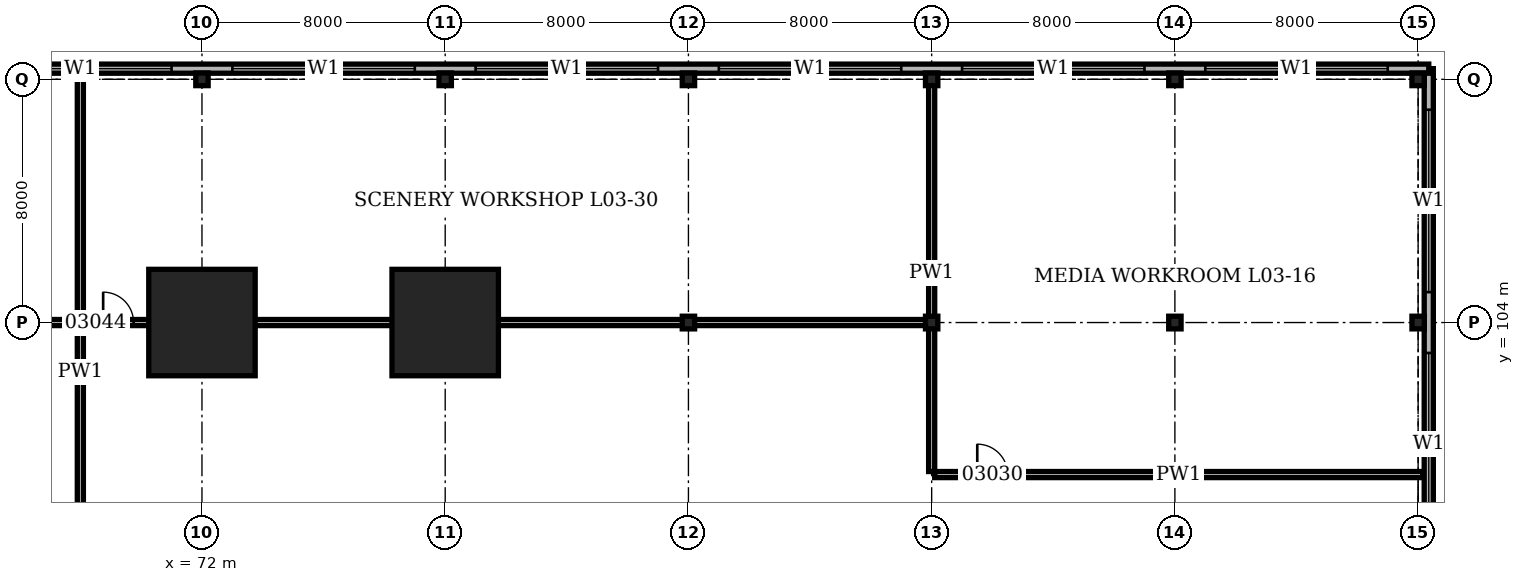
"""IFC4 building model, lengths in metres.
Left out: names, types, materials, properties, quantities, classifications, styles, units other than length and angle.
Written with IfcOpenShell. Run it as: python <this file> out.ifc"""

import sys

from ifc_helpers import new_model, si_unit, direction, frame, frame_2d, origin, origin_2d, place, context, subcontext, project, spatial, rectangle, hollow_rectangle, i_section, extrude, element, fill, save


model = new_model("IFC4")
c1 = context("Model", 3, precision=1e-05, world=origin(), true_north=direction((0.0, 1.0)))
c2 = subcontext(c1, "Body", "Model", "MODEL_VIEW")
j1 = project(units=[si_unit("LENGTHUNIT", "METRE"), si_unit("PLANEANGLEUNIT", "RADIAN")], contexts=[c1])
p1 = place(None, origin())
s1 = spatial("IfcSite", under=j1, at=p1, CompositionType="ELEMENT")
p2 = place(p1, origin())
s2 = spatial("IfcBuilding", under=s1, at=p2, CompositionType="ELEMENT")
p3 = place(p2, frame((0.0, 0.0, 14.9)))
s3 = spatial("IfcBuildingStorey", under=s2, at=p3, CompositionType="ELEMENT", Elevation=14.9)
p4 = place(p3, frame((72.0, 104.0, 0.0), z_axis=(0.0, 0.0, 1.0), x_axis=(1.0, 0.0, 0.0)))
e1 = element("IfcColumn", 1, at=p4, inside=s3, PredefinedType="COLUMN", context=c2, shape_type="SweptSolid", body=[
    extrude(hollow_rectangle(XDim=3.5, YDim=3.5, WallThickness=0.5, at=origin_2d()), origin(), (0.0, 0.0, 1.0), 5.0),
])
p5 = place(p3, frame((72.0, 112.0, 0.0), z_axis=(0.0, 0.0, 1.0), x_axis=(1.0, 0.0, 0.0)))
e2 = element("IfcColumn", 2, at=p5, inside=s3, PredefinedType="COLUMN", context=c2, shape_type="SweptSolid", body=[
    extrude(i_section(OverallWidth=0.406, OverallDepth=0.417, WebThickness=0.03, FlangeThickness=0.048, at=origin_2d()), origin(), (0.0, 0.0, 1.0), 5.0),
])
p6 = place(p3, frame((80.0, 104.0, 0.0), z_axis=(0.0, 0.0, 1.0), x_axis=(1.0, 0.0, 0.0)))
e3 = element("IfcColumn", 3, at=p6, inside=s3, PredefinedType="COLUMN", context=c2, shape_type="SweptSolid", body=[
    extrude(hollow_rectangle(XDim=3.5, YDim=3.5, WallThickness=0.5, at=origin_2d()), origin(), (0.0, 0.0, 1.0), 5.0),
])
for number, where, z_axis, x_axis in (
    (4, (80.0, 112.0, 0.0), (0.0, 0.0, 1.0), (1.0, 0.0, 0.0)),
    (5, (88.0, 104.0, 0.0), (0.0, 0.0, 1.0), (1.0, 0.0, 0.0)),
    (6, (88.0, 112.0, 0.0), (0.0, 0.0, 1.0), (1.0, 0.0, 0.0)),
    (7, (96.0, 104.0, 0.0), (0.0, 0.0, 1.0), (1.0, 0.0, 0.0)),
    (8, (96.0, 112.0, 0.0), (0.0, 0.0, 1.0), (1.0, 0.0, 0.0)),
    (9, (104.0, 104.0, 0.0), (0.0, 0.0, 1.0), (1.0, 0.0, 0.0)),
    (10, (104.0, 112.0, 0.0), (0.0, 0.0, 1.0), (1.0, 0.0, 0.0)),
    (11, (112.0, 104.0, 0.0), (0.0, 0.0, 1.0), (1.0, 0.0, 0.0)),
    (12, (112.0, 112.0, 0.0), (0.0, 0.0, 1.0), (1.0, 0.0, 0.0)),
):
    element("IfcColumn", number, at=place(p3, frame(where, z_axis=z_axis, x_axis=x_axis)), inside=s3, PredefinedType="COLUMN", context=c2, shape_type="SweptSolid", body=[
        extrude(i_section(OverallWidth=0.406, OverallDepth=0.417, WebThickness=0.03, FlangeThickness=0.048, at=origin_2d()), origin(), (0.0, 0.0, 1.0), 5.0),
    ])
p7 = place(p3, frame((112.35, -0.35, 0.0), z_axis=(0.0, 0.0, 1.0), x_axis=(0.0, 1.0, 0.0)))
e13 = element("IfcWall", 13, at=p7, inside=s3, PredefinedType="SOLIDWALL", context=c2, shape_type="SweptSolid", body=[
    extrude(rectangle(XDim=112.7, YDim=0.3, at=frame_2d((56.35, 0.0))), origin(), (0.0, 0.0, 1.0), 5.0),
])
p8 = place(p7, frame((1.35, 0.0, 1.0)))
e14 = element("IfcOpeningElement", 14, at=p8, cuts=e13, PredefinedType="OPENING", context=c2, shape_type="SweptSolid", body=[
    extrude(rectangle(XDim=6.0, YDim=1.5, at=frame_2d((3.0, 0.75))), frame((0.0, 0.16, 0.0), z_axis=(0.0, -1.0, 0.0), x_axis=(1.0, 0.0, 0.0)), (0.0, 0.0, 1.0), 0.32),
])
p9 = place(p7, frame((9.35, 0.0, 1.0)))
e15 = element("IfcOpeningElement", 15, at=p9, cuts=e13, PredefinedType="OPENING", context=c2, shape_type="SweptSolid", body=[
    extrude(rectangle(XDim=6.0, YDim=1.5, at=frame_2d((3.0, 0.75))), frame((0.0, 0.16, 0.0), z_axis=(0.0, -1.0, 0.0), x_axis=(1.0, 0.0, 0.0)), (0.0, 0.0, 1.0), 0.32),
])
p10 = place(p7, frame((17.35, 0.0, 1.0)))
e16 = element("IfcOpeningElement", 16, at=p10, cuts=e13, PredefinedType="OPENING", context=c2, shape_type="SweptSolid", body=[
    extrude(rectangle(XDim=6.0, YDim=1.5, at=frame_2d((3.0, 0.75))), frame((0.0, 0.16, 0.0), z_axis=(0.0, -1.0, 0.0), x_axis=(1.0, 0.0, 0.0)), (0.0, 0.0, 1.0), 0.32),
])
p11 = place(p7, frame((25.35, 0.0, 1.0)))
e17 = element("IfcOpeningElement", 17, at=p11, cuts=e13, PredefinedType="OPENING", context=c2, shape_type="SweptSolid", body=[
    extrude(rectangle(XDim=6.0, YDim=1.5, at=frame_2d((3.0, 0.75))), frame((0.0, 0.16, 0.0), z_axis=(0.0, -1.0, 0.0), x_axis=(1.0, 0.0, 0.0)), (0.0, 0.0, 1.0), 0.32),
])
p12 = place(p7, frame((33.35, 0.0, 1.0)))
e18 = element("IfcOpeningElement", 18, at=p12, cuts=e13, PredefinedType="OPENING", context=c2, shape_type="SweptSolid", body=[
    extrude(rectangle(XDim=6.0, YDim=1.5, at=frame_2d((3.0, 0.75))), frame((0.0, 0.16, 0.0), z_axis=(0.0, -1.0, 0.0), x_axis=(1.0, 0.0, 0.0)), (0.0, 0.0, 1.0), 0.32),
])
p13 = place(p7, frame((41.35, 0.0, 1.0)))
e19 = element("IfcOpeningElement", 19, at=p13, cuts=e13, PredefinedType="OPENING", context=c2, shape_type="SweptSolid", body=[
    extrude(rectangle(XDim=6.0, YDim=1.5, at=frame_2d((3.0, 0.75))), frame((0.0, 0.16, 0.0), z_axis=(0.0, -1.0, 0.0), x_axis=(1.0, 0.0, 0.0)), (0.0, 0.0, 1.0), 0.32),
])
p14 = place(p7, frame((49.35, 0.0, 1.0)))
e20 = element("IfcOpeningElement", 20, at=p14, cuts=e13, PredefinedType="OPENING", context=c2, shape_type="SweptSolid", body=[
    extrude(rectangle(XDim=6.0, YDim=1.5, at=frame_2d((3.0, 0.75))), frame((0.0, 0.16, 0.0), z_axis=(0.0, -1.0, 0.0), x_axis=(1.0, 0.0, 0.0)), (0.0, 0.0, 1.0), 0.32),
])
p15 = place(p7, frame((57.35, 0.0, 1.0)))
e21 = element("IfcOpeningElement", 21, at=p15, cuts=e13, PredefinedType="OPENING", context=c2, shape_type="SweptSolid", body=[
    extrude(rectangle(XDim=6.0, YDim=1.5, at=frame_2d((3.0, 0.75))), frame((0.0, 0.16, 0.0), z_axis=(0.0, -1.0, 0.0), x_axis=(1.0, 0.0, 0.0)), (0.0, 0.0, 1.0), 0.32),
])
p16 = place(p7, frame((65.35, 0.0, 1.0)))
e22 = element("IfcOpeningElement", 22, at=p16, cuts=e13, PredefinedType="OPENING", context=c2, shape_type="SweptSolid", body=[
    extrude(rectangle(XDim=6.0, YDim=1.5, at=frame_2d((3.0, 0.75))), frame((0.0, 0.16, 0.0), z_axis=(0.0, -1.0, 0.0), x_axis=(1.0, 0.0, 0.0)), (0.0, 0.0, 1.0), 0.32),
])
p17 = place(p7, frame((73.35, 0.0, 1.0)))
e23 = element("IfcOpeningElement", 23, at=p17, cuts=e13, PredefinedType="OPENING", context=c2, shape_type="SweptSolid", body=[
    extrude(rectangle(XDim=6.0, YDim=1.5, at=frame_2d((3.0, 0.75))), frame((0.0, 0.16, 0.0), z_axis=(0.0, -1.0, 0.0), x_axis=(1.0, 0.0, 0.0)), (0.0, 0.0, 1.0), 0.32),
])
p18 = place(p7, frame((81.35, 0.0, 1.0)))
e24 = element("IfcOpeningElement", 24, at=p18, cuts=e13, PredefinedType="OPENING", context=c2, shape_type="SweptSolid", body=[
    extrude(rectangle(XDim=6.0, YDim=1.5, at=frame_2d((3.0, 0.75))), frame((0.0, 0.16, 0.0), z_axis=(0.0, -1.0, 0.0), x_axis=(1.0, 0.0, 0.0)), (0.0, 0.0, 1.0), 0.32),
])
p19 = place(p7, frame((89.35, 0.0, 1.0)))
e25 = element("IfcOpeningElement", 25, at=p19, cuts=e13, PredefinedType="OPENING", context=c2, shape_type="SweptSolid", body=[
    extrude(rectangle(XDim=6.0, YDim=1.5, at=frame_2d((3.0, 0.75))), frame((0.0, 0.16, 0.0), z_axis=(0.0, -1.0, 0.0), x_axis=(1.0, 0.0, 0.0)), (0.0, 0.0, 1.0), 0.32),
])
p20 = place(p7, frame((97.35, 0.0, 1.0)))
e26 = element("IfcOpeningElement", 26, at=p20, cuts=e13, PredefinedType="OPENING", context=c2, shape_type="SweptSolid", body=[
    extrude(rectangle(XDim=6.0, YDim=1.5, at=frame_2d((3.0, 0.75))), frame((0.0, 0.16, 0.0), z_axis=(0.0, -1.0, 0.0), x_axis=(1.0, 0.0, 0.0)), (0.0, 0.0, 1.0), 0.32),
])
p21 = place(p7, frame((105.35, 0.0, 1.0)))
e27 = element("IfcOpeningElement", 27, at=p21, cuts=e13, PredefinedType="OPENING", context=c2, shape_type="SweptSolid", body=[
    extrude(rectangle(XDim=6.0, YDim=1.5, at=frame_2d((3.0, 0.75))), frame((0.0, 0.16, 0.0), z_axis=(0.0, -1.0, 0.0), x_axis=(1.0, 0.0, 0.0)), (0.0, 0.0, 1.0), 0.32),
])
p22 = place(p3, frame((112.35, 112.35, 0.0), z_axis=(0.0, 0.0, 1.0), x_axis=(-1.0, 0.0, 0.0)))
e28 = element("IfcWall", 28, at=p22, inside=s3, PredefinedType="SOLIDWALL", context=c2, shape_type="SweptSolid", body=[
    extrude(rectangle(XDim=112.7, YDim=0.3, at=frame_2d((56.35, 0.0))), origin(), (0.0, 0.0, 1.0), 5.0),
])
p23 = place(p22, frame((1.35, 0.0, 1.0)))
e29 = element("IfcOpeningElement", 29, at=p23, cuts=e28, PredefinedType="OPENING", context=c2, shape_type="SweptSolid", body=[
    extrude(rectangle(XDim=6.0, YDim=1.5, at=frame_2d((3.0, 0.75))), frame((0.0, 0.16, 0.0), z_axis=(0.0, -1.0, 0.0), x_axis=(1.0, 0.0, 0.0)), (0.0, 0.0, 1.0), 0.32),
])
p24 = place(p22, frame((9.35, 0.0, 1.0)))
e30 = element("IfcOpeningElement", 30, at=p24, cuts=e28, PredefinedType="OPENING", context=c2, shape_type="SweptSolid", body=[
    extrude(rectangle(XDim=6.0, YDim=1.5, at=frame_2d((3.0, 0.75))), frame((0.0, 0.16, 0.0), z_axis=(0.0, -1.0, 0.0), x_axis=(1.0, 0.0, 0.0)), (0.0, 0.0, 1.0), 0.32),
])
p25 = place(p22, frame((17.35, 0.0, 1.0)))
e31 = element("IfcOpeningElement", 31, at=p25, cuts=e28, PredefinedType="OPENING", context=c2, shape_type="SweptSolid", body=[
    extrude(rectangle(XDim=6.0, YDim=1.5, at=frame_2d((3.0, 0.75))), frame((0.0, 0.16, 0.0), z_axis=(0.0, -1.0, 0.0), x_axis=(1.0, 0.0, 0.0)), (0.0, 0.0, 1.0), 0.32),
])
p26 = place(p22, frame((25.35, 0.0, 1.0)))
e32 = element("IfcOpeningElement", 32, at=p26, cuts=e28, PredefinedType="OPENING", context=c2, shape_type="SweptSolid", body=[
    extrude(rectangle(XDim=6.0, YDim=1.5, at=frame_2d((3.0, 0.75))), frame((0.0, 0.16, 0.0), z_axis=(0.0, -1.0, 0.0), x_axis=(1.0, 0.0, 0.0)), (0.0, 0.0, 1.0), 0.32),
])
p27 = place(p22, frame((33.35, 0.0, 1.0)))
e33 = element("IfcOpeningElement", 33, at=p27, cuts=e28, PredefinedType="OPENING", context=c2, shape_type="SweptSolid", body=[
    extrude(rectangle(XDim=6.0, YDim=1.5, at=frame_2d((3.0, 0.75))), frame((0.0, 0.16, 0.0), z_axis=(0.0, -1.0, 0.0), x_axis=(1.0, 0.0, 0.0)), (0.0, 0.0, 1.0), 0.32),
])
p28 = place(p22, frame((41.35, 0.0, 1.0)))
e34 = element("IfcOpeningElement", 34, at=p28, cuts=e28, PredefinedType="OPENING", context=c2, shape_type="SweptSolid", body=[
    extrude(rectangle(XDim=6.0, YDim=1.5, at=frame_2d((3.0, 0.75))), frame((0.0, 0.16, 0.0), z_axis=(0.0, -1.0, 0.0), x_axis=(1.0, 0.0, 0.0)), (0.0, 0.0, 1.0), 0.32),
])
p29 = place(p22, frame((49.35, 0.0, 1.0)))
e35 = element("IfcOpeningElement", 35, at=p29, cuts=e28, PredefinedType="OPENING", context=c2, shape_type="SweptSolid", body=[
    extrude(rectangle(XDim=6.0, YDim=1.5, at=frame_2d((3.0, 0.75))), frame((0.0, 0.16, 0.0), z_axis=(0.0, -1.0, 0.0), x_axis=(1.0, 0.0, 0.0)), (0.0, 0.0, 1.0), 0.32),
])
p30 = place(p22, frame((57.35, 0.0, 1.0)))
e36 = element("IfcOpeningElement", 36, at=p30, cuts=e28, PredefinedType="OPENING", context=c2, shape_type="SweptSolid", body=[
    extrude(rectangle(XDim=6.0, YDim=1.5, at=frame_2d((3.0, 0.75))), frame((0.0, 0.16, 0.0), z_axis=(0.0, -1.0, 0.0), x_axis=(1.0, 0.0, 0.0)), (0.0, 0.0, 1.0), 0.32),
])
p31 = place(p22, frame((65.35, 0.0, 1.0)))
e37 = element("IfcOpeningElement", 37, at=p31, cuts=e28, PredefinedType="OPENING", context=c2, shape_type="SweptSolid", body=[
    extrude(rectangle(XDim=6.0, YDim=1.5, at=frame_2d((3.0, 0.75))), frame((0.0, 0.16, 0.0), z_axis=(0.0, -1.0, 0.0), x_axis=(1.0, 0.0, 0.0)), (0.0, 0.0, 1.0), 0.32),
])
p32 = place(p22, frame((73.35, 0.0, 1.0)))
e38 = element("IfcOpeningElement", 38, at=p32, cuts=e28, PredefinedType="OPENING", context=c2, shape_type="SweptSolid", body=[
    extrude(rectangle(XDim=6.0, YDim=1.5, at=frame_2d((3.0, 0.75))), frame((0.0, 0.16, 0.0), z_axis=(0.0, -1.0, 0.0), x_axis=(1.0, 0.0, 0.0)), (0.0, 0.0, 1.0), 0.32),
])
p33 = place(p22, frame((81.35, 0.0, 1.0)))
e39 = element("IfcOpeningElement", 39, at=p33, cuts=e28, PredefinedType="OPENING", context=c2, shape_type="SweptSolid", body=[
    extrude(rectangle(XDim=6.0, YDim=1.5, at=frame_2d((3.0, 0.75))), frame((0.0, 0.16, 0.0), z_axis=(0.0, -1.0, 0.0), x_axis=(1.0, 0.0, 0.0)), (0.0, 0.0, 1.0), 0.32),
])
p34 = place(p22, frame((89.35, 0.0, 1.0)))
e40 = element("IfcOpeningElement", 40, at=p34, cuts=e28, PredefinedType="OPENING", context=c2, shape_type="SweptSolid", body=[
    extrude(rectangle(XDim=6.0, YDim=1.5, at=frame_2d((3.0, 0.75))), frame((0.0, 0.16, 0.0), z_axis=(0.0, -1.0, 0.0), x_axis=(1.0, 0.0, 0.0)), (0.0, 0.0, 1.0), 0.32),
])
p35 = place(p22, frame((97.35, 0.0, 1.0)))
e41 = element("IfcOpeningElement", 41, at=p35, cuts=e28, PredefinedType="OPENING", context=c2, shape_type="SweptSolid", body=[
    extrude(rectangle(XDim=6.0, YDim=1.5, at=frame_2d((3.0, 0.75))), frame((0.0, 0.16, 0.0), z_axis=(0.0, -1.0, 0.0), x_axis=(1.0, 0.0, 0.0)), (0.0, 0.0, 1.0), 0.32),
])
p36 = place(p22, frame((105.35, 0.0, 1.0)))
e42 = element("IfcOpeningElement", 42, at=p36, cuts=e28, PredefinedType="OPENING", context=c2, shape_type="SweptSolid", body=[
    extrude(rectangle(XDim=6.0, YDim=1.5, at=frame_2d((3.0, 0.75))), frame((0.0, 0.16, 0.0), z_axis=(0.0, -1.0, 0.0), x_axis=(1.0, 0.0, 0.0)), (0.0, 0.0, 1.0), 0.32),
])
p37 = place(p3, frame((96.1, 99.0, 0.0), z_axis=(0.0, 0.0, 1.0), x_axis=(1.0, 0.0, 0.0)))
e43 = element("IfcWall", 43, at=p37, inside=s3, PredefinedType="PARTITIONING", context=c2, shape_type="SweptSolid", body=[
    extrude(rectangle(XDim=16.05, YDim=0.2, at=frame_2d((8.025, 0.0))), origin(), (0.0, 0.0, 1.0), 4.8),
])
p38 = place(p37, frame((1.4, 0.0, 0.0)))
e44 = element("IfcOpeningElement", 44, at=p38, cuts=e43, PredefinedType="OPENING", context=c2, shape_type="SweptSolid", body=[
    extrude(rectangle(XDim=1.0, YDim=2.1, at=frame_2d((0.5, 1.05))), frame((0.0, 0.11, 0.0), z_axis=(0.0, -1.0, 0.0), x_axis=(1.0, 0.0, 0.0)), (0.0, 0.0, 1.0), 0.22),
])
p39 = place(p3, frame((12.95, 104.0, 0.0), z_axis=(0.0, 0.0, 1.0), x_axis=(1.0, 0.0, 0.0)))
e45 = element("IfcWall", 45, at=p39, inside=s3, PredefinedType="PARTITIONING", context=c2, shape_type="SweptSolid", body=[
    extrude(rectangle(XDim=82.95, YDim=0.2, at=frame_2d((41.475, 0.0))), origin(), (0.0, 0.0, 1.0), 4.028),
])
p40 = place(p39, frame((1.4, 0.0, 0.0)))
e46 = element("IfcOpeningElement", 46, at=p40, cuts=e45, PredefinedType="OPENING", context=c2, shape_type="SweptSolid", body=[
    extrude(rectangle(XDim=1.0, YDim=2.1, at=frame_2d((0.5, 1.05))), frame((0.0, 0.11, 0.0), z_axis=(0.0, -1.0, 0.0), x_axis=(1.0, 0.0, 0.0)), (0.0, 0.0, 1.0), 0.22),
])
p41 = place(p39, frame((31.8, 0.0, 0.0)))
e47 = element("IfcOpeningElement", 47, at=p41, cuts=e45, PredefinedType="OPENING", context=c2, shape_type="SweptSolid", body=[
    extrude(rectangle(XDim=1.0, YDim=2.1, at=frame_2d((0.5, 1.05))), frame((0.0, 0.11, 0.0), z_axis=(0.0, -1.0, 0.0), x_axis=(1.0, 0.0, 0.0)), (0.0, 0.0, 1.0), 0.22),
])
p42 = place(p39, frame((55.8, 0.0, 0.0)))
e48 = element("IfcOpeningElement", 48, at=p42, cuts=e45, PredefinedType="OPENING", context=c2, shape_type="SweptSolid", body=[
    extrude(rectangle(XDim=1.0, YDim=2.1, at=frame_2d((0.5, 1.05))), frame((0.0, 0.11, 0.0), z_axis=(0.0, -1.0, 0.0), x_axis=(1.0, 0.0, 0.0)), (0.0, 0.0, 1.0), 0.22),
])
p43 = place(p3, frame((68.0, 92.6, 0.0), z_axis=(0.0, 0.0, 1.0), x_axis=(0.0, 1.0, 0.0)))
e49 = element("IfcWall", 49, at=p43, inside=s3, PredefinedType="PARTITIONING", context=c2, shape_type="SweptSolid", body=[
    extrude(rectangle(XDim=19.55, YDim=0.2, at=frame_2d((9.775, 0.0))), origin(), (0.0, 0.0, 1.0), 4.8),
])
p44 = place(p3, frame((96.0, 99.1, 0.0), z_axis=(0.0, 0.0, 1.0), x_axis=(0.0, 1.0, 0.0)))
e50 = element("IfcWall", 50, at=p44, inside=s3, PredefinedType="PARTITIONING", context=c2, shape_type="SweptSolid", body=[
    extrude(rectangle(XDim=13.05, YDim=0.2, at=frame_2d((6.525, 0.0))), origin(), (0.0, 0.0, 1.0), 4.028),
])
p45 = place(p20, origin())
e51 = element("IfcWindow", 51, at=p45, inside=s3, PartitioningType="SINGLE_PANEL", PredefinedType="WINDOW", context=c2, shape_type="SweptSolid", body=[
    extrude(rectangle(XDim=6.0, YDim=1.5, at=frame_2d((3.0, 0.75))), frame((0.0, 0.03, 0.0), z_axis=(0.0, -1.0, 0.0), x_axis=(1.0, 0.0, 0.0)), (0.0, 0.0, 1.0), 0.06),
])
fill(e26, e51)
p46 = place(p21, origin())
e52 = element("IfcWindow", 52, at=p46, inside=s3, PartitioningType="SINGLE_PANEL", PredefinedType="WINDOW", context=c2, shape_type="SweptSolid", body=[
    extrude(rectangle(XDim=6.0, YDim=1.5, at=frame_2d((3.0, 0.75))), frame((0.0, 0.03, 0.0), z_axis=(0.0, -1.0, 0.0), x_axis=(1.0, 0.0, 0.0)), (0.0, 0.0, 1.0), 0.06),
])
fill(e27, e52)
p47 = place(p23, origin())
e53 = element("IfcWindow", 53, at=p47, inside=s3, PartitioningType="SINGLE_PANEL", PredefinedType="WINDOW", context=c2, shape_type="SweptSolid", body=[
    extrude(rectangle(XDim=6.0, YDim=1.5, at=frame_2d((3.0, 0.75))), frame((0.0, 0.03, 0.0), z_axis=(0.0, -1.0, 0.0), x_axis=(1.0, 0.0, 0.0)), (0.0, 0.0, 1.0), 0.06),
])
fill(e29, e53)
p48 = place(p24, origin())
e54 = element("IfcWindow", 54, at=p48, inside=s3, PartitioningType="SINGLE_PANEL", PredefinedType="WINDOW", context=c2, shape_type="SweptSolid", body=[
    extrude(rectangle(XDim=6.0, YDim=1.5, at=frame_2d((3.0, 0.75))), frame((0.0, 0.03, 0.0), z_axis=(0.0, -1.0, 0.0), x_axis=(1.0, 0.0, 0.0)), (0.0, 0.0, 1.0), 0.06),
])
fill(e30, e54)
p49 = place(p25, origin())
e55 = element("IfcWindow", 55, at=p49, inside=s3, PartitioningType="SINGLE_PANEL", PredefinedType="WINDOW", context=c2, shape_type="SweptSolid", body=[
    extrude(rectangle(XDim=6.0, YDim=1.5, at=frame_2d((3.0, 0.75))), frame((0.0, 0.03, 0.0), z_axis=(0.0, -1.0, 0.0), x_axis=(1.0, 0.0, 0.0)), (0.0, 0.0, 1.0), 0.06),
])
fill(e31, e55)
p50 = place(p26, origin())
e56 = element("IfcWindow", 56, at=p50, inside=s3, PartitioningType="SINGLE_PANEL", PredefinedType="WINDOW", context=c2, shape_type="SweptSolid", body=[
    extrude(rectangle(XDim=6.0, YDim=1.5, at=frame_2d((3.0, 0.75))), frame((0.0, 0.03, 0.0), z_axis=(0.0, -1.0, 0.0), x_axis=(1.0, 0.0, 0.0)), (0.0, 0.0, 1.0), 0.06),
])
fill(e32, e56)
p51 = place(p27, origin())
e57 = element("IfcWindow", 57, at=p51, inside=s3, PartitioningType="SINGLE_PANEL", PredefinedType="WINDOW", context=c2, shape_type="SweptSolid", body=[
    extrude(rectangle(XDim=6.0, YDim=1.5, at=frame_2d((3.0, 0.75))), frame((0.0, 0.03, 0.0), z_axis=(0.0, -1.0, 0.0), x_axis=(1.0, 0.0, 0.0)), (0.0, 0.0, 1.0), 0.06),
])
fill(e33, e57)
p52 = place(p28, origin())
e58 = element("IfcWindow", 58, at=p52, inside=s3, PartitioningType="SINGLE_PANEL", PredefinedType="WINDOW", context=c2, shape_type="SweptSolid", body=[
    extrude(rectangle(XDim=6.0, YDim=1.5, at=frame_2d((3.0, 0.75))), frame((0.0, 0.03, 0.0), z_axis=(0.0, -1.0, 0.0), x_axis=(1.0, 0.0, 0.0)), (0.0, 0.0, 1.0), 0.06),
])
fill(e34, e58)
p53 = place(p38, origin())
e59 = element("IfcDoor", 59, at=p53, inside=s3, OperationType="SINGLE_SWING_LEFT", PredefinedType="DOOR", context=c2, shape_type="SweptSolid", body=[
    extrude(rectangle(XDim=1.0, YDim=2.1, at=frame_2d((0.5, 1.05))), frame((0.0, 0.1, 0.0), z_axis=(0.0, -1.0, 0.0), x_axis=(1.0, 0.0, 0.0)), (0.0, 0.0, 1.0), 0.199),
])
fill(e44, e59)
p54 = place(p42, origin())
e60 = element("IfcDoor", 60, at=p54, inside=s3, OperationType="SINGLE_SWING_LEFT", PredefinedType="DOOR", context=c2, shape_type="SweptSolid", body=[
    extrude(rectangle(XDim=1.0, YDim=2.1, at=frame_2d((0.5, 1.05))), frame((0.0, 0.1, 0.0), z_axis=(0.0, -1.0, 0.0), x_axis=(1.0, 0.0, 0.0)), (0.0, 0.0, 1.0), 0.199),
])
fill(e48, e60)
save(model, sys.argv[1])
